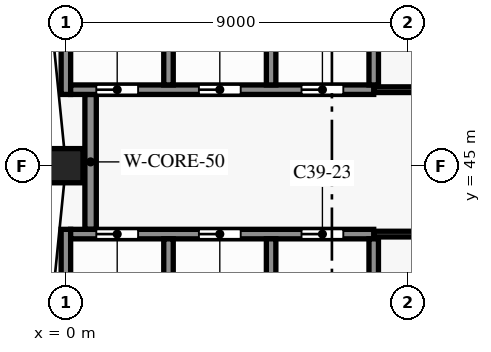
"""IFC4 building model, lengths in metres.
Left out: names, types, materials, properties, quantities, classifications, styles, units other than length and angle.
Written with IfcOpenShell. Run it as: python <this file> out.ifc"""

import sys

from ifc_helpers import new_model, si_unit, direction, frame, frame_2d, origin, origin_2d, place, context, subcontext, project, spatial, rectangle, extrude, element, fill, save


model = new_model("IFC4")
c1 = context("Model", 3, precision=1e-05, world=origin(), true_north=direction((0.0, 1.0)))
c2 = subcontext(c1, "Body", "Model", "MODEL_VIEW")
j1 = project(units=[si_unit("LENGTHUNIT", "METRE"), si_unit("PLANEANGLEUNIT", "RADIAN")], contexts=[c1])
p1 = place(None, origin())
s1 = spatial("IfcSite", under=j1, at=p1, CompositionType="ELEMENT")
p2 = place(p1, origin())
s2 = spatial("IfcBuilding", under=s1, at=p2, CompositionType="ELEMENT")
p3 = place(p2, frame((0.0, 0.0, 279.0)))
s3 = spatial("IfcBuildingStorey", under=s2, at=p3, CompositionType="ELEMENT", Elevation=279.0)
p4 = place(p3, frame((0.0, 45.0, 0.0), z_axis=(0.0, 0.0, 1.0), x_axis=(0.0, -1.0, 0.0)))
e1 = element("IfcColumn", 1, at=p4, inside=s3, PredefinedType="COLUMN", context=c2, shape_type="SweptSolid", body=[
    extrude(rectangle(XDim=0.9, YDim=0.9, at=origin_2d()), origin(), (0.0, 0.0, 1.0), 3.8),
])
p5 = place(p3, frame((8.1, 43.2, 0.0), z_axis=(0.0, 0.0, 1.0), x_axis=(1.0, 0.0, 0.0)))
e2 = element("IfcWall", 2, at=p5, inside=s3, PredefinedType="SHEAR", context=c2, shape_type="SweptSolid", body=[
    extrude(rectangle(XDim=16.125, YDim=0.15, at=frame_2d((8.062, 0.0))), origin(), (0.0, 0.0, 1.0), 3.5),
])
p6 = place(p5, frame((5.825, 0.0, 0.0)))
e3 = element("IfcOpeningElement", 3, at=p6, cuts=e2, PredefinedType="OPENING", context=c2, shape_type="SweptSolid", body=[
    extrude(rectangle(XDim=0.9, YDim=2.1, at=frame_2d((0.45, 1.05))), frame((0.0, 0.085, 0.0), z_axis=(0.0, -1.0, 0.0), x_axis=(1.0, 0.0, 0.0)), (0.0, 0.0, 1.0), 0.17),
])
p7 = place(p5, frame((13.075, 0.0, 0.0)))
e4 = element("IfcOpeningElement", 4, at=p7, cuts=e2, PredefinedType="OPENING", context=c2, shape_type="SweptSolid", body=[
    extrude(rectangle(XDim=0.9, YDim=2.1, at=frame_2d((0.45, 1.05))), frame((0.0, 0.085, 0.0), z_axis=(0.0, -1.0, 0.0), x_axis=(1.0, 0.0, 0.0)), (0.0, 0.0, 1.0), 0.17),
])
p8 = place(p3, frame((0.125, 43.2, 0.0), z_axis=(0.0, 0.0, 1.0), x_axis=(1.0, 0.0, 0.0)))
e5 = element("IfcWall", 5, at=p8, inside=s3, PredefinedType="SHEAR", context=c2, shape_type="SweptSolid", body=[
    extrude(rectangle(XDim=7.975, YDim=0.25, at=frame_2d((3.988, 0.0))), origin(), (0.0, 0.0, 1.0), 3.5),
])
p9 = place(p8, frame((0.675, 0.0, 0.0)))
e6 = element("IfcOpeningElement", 6, at=p9, cuts=e5, PredefinedType="OPENING", context=c2, shape_type="SweptSolid", body=[
    extrude(rectangle(XDim=1.1, YDim=2.1, at=frame_2d((0.55, 1.05))), frame((0.0, 0.135, 0.0), z_axis=(0.0, -1.0, 0.0), x_axis=(1.0, 0.0, 0.0)), (0.0, 0.0, 1.0), 0.27),
])
p10 = place(p8, frame((3.375, 0.0, 0.0)))
e7 = element("IfcOpeningElement", 7, at=p10, cuts=e5, PredefinedType="OPENING", context=c2, shape_type="SweptSolid", body=[
    extrude(rectangle(XDim=1.1, YDim=2.1, at=frame_2d((0.55, 1.05))), frame((0.0, 0.135, 0.0), z_axis=(0.0, -1.0, 0.0), x_axis=(1.0, 0.0, 0.0)), (0.0, 0.0, 1.0), 0.27),
])
p11 = place(p8, frame((6.075, 0.0, 0.0)))
e8 = element("IfcOpeningElement", 8, at=p11, cuts=e5, PredefinedType="OPENING", context=c2, shape_type="SweptSolid", body=[
    extrude(rectangle(XDim=1.1, YDim=2.1, at=frame_2d((0.55, 1.05))), frame((0.0, 0.135, 0.0), z_axis=(0.0, -1.0, 0.0), x_axis=(1.0, 0.0, 0.0)), (0.0, 0.0, 1.0), 0.27),
])
p12 = place(p3, frame((8.1, 47.0, 0.0), z_axis=(0.0, 0.0, 1.0), x_axis=(1.0, 0.0, 0.0)))
e9 = element("IfcWall", 9, at=p12, inside=s3, PredefinedType="SHEAR", context=c2, shape_type="SweptSolid", body=[
    extrude(rectangle(XDim=13.5, YDim=0.15, at=frame_2d((6.75, 0.0))), origin(), (0.0, 0.0, 1.0), 3.5),
])
p13 = place(p12, frame((4.075, 0.0, 0.0)))
e10 = element("IfcOpeningElement", 10, at=p13, cuts=e9, PredefinedType="OPENING", context=c2, shape_type="SweptSolid", body=[
    extrude(rectangle(XDim=0.9, YDim=2.1, at=frame_2d((0.45, 1.05))), frame((0.0, 0.085, 0.0), z_axis=(0.0, -1.0, 0.0), x_axis=(1.0, 0.0, 0.0)), (0.0, 0.0, 1.0), 0.17),
])
p14 = place(p12, frame((11.375, 0.0, 0.0)))
e11 = element("IfcOpeningElement", 11, at=p14, cuts=e9, PredefinedType="OPENING", context=c2, shape_type="SweptSolid", body=[
    extrude(rectangle(XDim=0.9, YDim=2.1, at=frame_2d((0.45, 1.05))), frame((0.0, 0.085, 0.0), z_axis=(0.0, -1.0, 0.0), x_axis=(1.0, 0.0, 0.0)), (0.0, 0.0, 1.0), 0.17),
])
p15 = place(p3, frame((0.125, 47.0, 0.0), z_axis=(0.0, 0.0, 1.0), x_axis=(1.0, 0.0, 0.0)))
e12 = element("IfcWall", 12, at=p15, inside=s3, PredefinedType="SHEAR", context=c2, shape_type="SweptSolid", body=[
    extrude(rectangle(XDim=7.975, YDim=0.25, at=frame_2d((3.988, 0.0))), origin(), (0.0, 0.0, 1.0), 3.5),
])
p16 = place(p15, frame((0.675, 0.0, 0.0)))
e13 = element("IfcOpeningElement", 13, at=p16, cuts=e12, PredefinedType="OPENING", context=c2, shape_type="SweptSolid", body=[
    extrude(rectangle(XDim=1.1, YDim=2.1, at=frame_2d((0.55, 1.05))), frame((0.0, 0.135, 0.0), z_axis=(0.0, -1.0, 0.0), x_axis=(1.0, 0.0, 0.0)), (0.0, 0.0, 1.0), 0.27),
])
p17 = place(p15, frame((3.375, 0.0, 0.0)))
e14 = element("IfcOpeningElement", 14, at=p17, cuts=e12, PredefinedType="OPENING", context=c2, shape_type="SweptSolid", body=[
    extrude(rectangle(XDim=1.1, YDim=2.1, at=frame_2d((0.55, 1.05))), frame((0.0, 0.135, 0.0), z_axis=(0.0, -1.0, 0.0), x_axis=(1.0, 0.0, 0.0)), (0.0, 0.0, 1.0), 0.27),
])
p18 = place(p15, frame((6.075, 0.0, 0.0)))
e15 = element("IfcOpeningElement", 15, at=p18, cuts=e12, PredefinedType="OPENING", context=c2, shape_type="SweptSolid", body=[
    extrude(rectangle(XDim=1.1, YDim=2.1, at=frame_2d((0.55, 1.05))), frame((0.0, 0.135, 0.0), z_axis=(0.0, -1.0, 0.0), x_axis=(1.0, 0.0, 0.0)), (0.0, 0.0, 1.0), 0.27),
])
p19 = place(p3, frame((0.0, 40.0, 0.0), z_axis=(0.0, 0.0, 1.0), x_axis=(0.0, 1.0, 0.0)))
e16 = element("IfcWall", 16, at=p19, inside=s3, PredefinedType="SHEAR", context=c2, shape_type="SweptSolid", body=[
    extrude(rectangle(XDim=3.325, YDim=0.25, at=frame_2d((1.663, 0.0))), origin(), (0.0, 0.0, 1.0), 3.5),
])
p20 = place(p3, frame((0.0, 46.875, 0.0), z_axis=(0.0, 0.0, 1.0), x_axis=(0.0, 1.0, 0.0)))
e17 = element("IfcWall", 17, at=p20, inside=s3, PredefinedType="SHEAR", context=c2, shape_type="SweptSolid", body=[
    extrude(rectangle(XDim=3.475, YDim=0.25, at=frame_2d((1.738, 0.0))), origin(), (0.0, 0.0, 1.0), 3.5),
])
p21 = place(p3, frame((0.65, 43.325, 0.0), z_axis=(0.0, 0.0, 1.0), x_axis=(0.0, 1.0, 0.0)))
e18 = element("IfcWall", 18, at=p21, inside=s3, PredefinedType="SHEAR", context=c2, shape_type="SweptSolid", body=[
    extrude(rectangle(XDim=3.55, YDim=0.3, at=frame_2d((1.775, 0.0))), origin(), (0.0, 0.0, 1.0), 3.5),
])
for number, where, z_axis, x_axis in (
    (19, (2.7, 40.125, 0.0), (0.0, 0.0, 1.0), (0.0, 1.0, 0.0)),
    (20, (2.7, 47.125, 0.0), (0.0, 0.0, 1.0), (0.0, 1.0, 0.0)),
    (21, (5.4, 40.125, 0.0), (0.0, 0.0, 1.0), (0.0, 1.0, 0.0)),
    (22, (5.4, 47.125, 0.0), (0.0, 0.0, 1.0), (0.0, 1.0, 0.0)),
    (23, (8.1, 40.125, 0.0), (0.0, 0.0, 1.0), (0.0, 1.0, 0.0)),
):
    element("IfcWall", number, at=place(p3, frame(where, z_axis=z_axis, x_axis=x_axis)), inside=s3, PredefinedType="SHEAR", context=c2, shape_type="SweptSolid", body=[
        extrude(rectangle(XDim=2.95, YDim=0.25, at=frame_2d((1.475, 0.0))), origin(), (0.0, 0.0, 1.0), 3.5),
    ])
p22 = place(p3, frame((8.1, 47.125, 0.0), z_axis=(0.0, 0.0, 1.0), x_axis=(0.0, 1.0, 0.0)))
e24 = element("IfcWall", 24, at=p22, inside=s3, PredefinedType="SHEAR", context=c2, shape_type="SweptSolid", body=[
    extrude(rectangle(XDim=3.075, YDim=0.25, at=frame_2d((1.538, 0.0))), origin(), (0.0, 0.0, 1.0), 3.5),
])
p23 = place(p9, origin())
e25 = element("IfcDoor", 25, at=p23, inside=s3, OperationType="DOUBLE_DOOR_SLIDING", PredefinedType="DOOR", context=c2, shape_type="SweptSolid", body=[
    extrude(rectangle(XDim=1.1, YDim=2.1, at=frame_2d((0.55, 1.05))), frame((0.0, 0.025, 0.0), z_axis=(0.0, -1.0, 0.0), x_axis=(1.0, 0.0, 0.0)), (0.0, 0.0, 1.0), 0.05),
])
fill(e6, e25)
p24 = place(p10, origin())
e26 = element("IfcDoor", 26, at=p24, inside=s3, OperationType="DOUBLE_DOOR_SLIDING", PredefinedType="DOOR", context=c2, shape_type="SweptSolid", body=[
    extrude(rectangle(XDim=1.1, YDim=2.1, at=frame_2d((0.55, 1.05))), frame((0.0, 0.025, 0.0), z_axis=(0.0, -1.0, 0.0), x_axis=(1.0, 0.0, 0.0)), (0.0, 0.0, 1.0), 0.05),
])
fill(e7, e26)
p25 = place(p11, origin())
e27 = element("IfcDoor", 27, at=p25, inside=s3, OperationType="DOUBLE_DOOR_SLIDING", PredefinedType="DOOR", context=c2, shape_type="SweptSolid", body=[
    extrude(rectangle(XDim=1.1, YDim=2.1, at=frame_2d((0.55, 1.05))), frame((0.0, 0.025, 0.0), z_axis=(0.0, -1.0, 0.0), x_axis=(1.0, 0.0, 0.0)), (0.0, 0.0, 1.0), 0.05),
])
fill(e8, e27)
p26 = place(p16, origin())
e28 = element("IfcDoor", 28, at=p26, inside=s3, OperationType="DOUBLE_DOOR_SLIDING", PredefinedType="DOOR", context=c2, shape_type="SweptSolid", body=[
    extrude(rectangle(XDim=1.1, YDim=2.1, at=frame_2d((0.55, 1.05))), frame((0.0, 0.025, 0.0), z_axis=(0.0, -1.0, 0.0), x_axis=(1.0, 0.0, 0.0)), (0.0, 0.0, 1.0), 0.05),
])
fill(e13, e28)
p27 = place(p17, origin())
e29 = element("IfcDoor", 29, at=p27, inside=s3, OperationType="DOUBLE_DOOR_SLIDING", PredefinedType="DOOR", context=c2, shape_type="SweptSolid", body=[
    extrude(rectangle(XDim=1.1, YDim=2.1, at=frame_2d((0.55, 1.05))), frame((0.0, 0.025, 0.0), z_axis=(0.0, -1.0, 0.0), x_axis=(1.0, 0.0, 0.0)), (0.0, 0.0, 1.0), 0.05),
])
fill(e14, e29)
p28 = place(p18, origin())
e30 = element("IfcDoor", 30, at=p28, inside=s3, OperationType="DOUBLE_DOOR_SLIDING", PredefinedType="DOOR", context=c2, shape_type="SweptSolid", body=[
    extrude(rectangle(XDim=1.1, YDim=2.1, at=frame_2d((0.55, 1.05))), frame((0.0, 0.025, 0.0), z_axis=(0.0, -1.0, 0.0), x_axis=(1.0, 0.0, 0.0)), (0.0, 0.0, 1.0), 0.05),
])
fill(e15, e30)
save(model, sys.argv[1])
